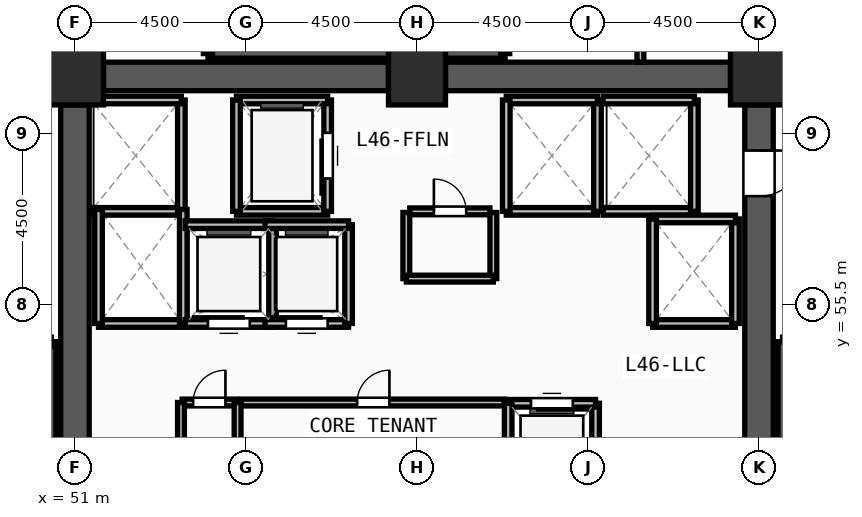
"""IFC4 building model, lengths in metres.
Left out: names, types, materials, properties, quantities, classifications, styles, units other than length and angle.
Written with IfcOpenShell. Run it as: python <this file> out.ifc"""

import sys

from ifc_helpers import new_model, si_unit, direction, frame, frame_2d, origin, origin_2d, place, context, subcontext, project, spatial, rectangle, extrude, source, transform, mapped, element, fill, save


model = new_model("IFC4")
c1 = context("Model", 3, precision=1e-05, world=origin(), true_north=direction((0.0, 1.0)))
c2 = subcontext(c1, "Body", "Model", "MODEL_VIEW")
j1 = project(units=[si_unit("LENGTHUNIT", "METRE"), si_unit("PLANEANGLEUNIT", "RADIAN")], contexts=[c1])
p1 = place(None, origin())
s1 = spatial("IfcSite", under=j1, at=p1, CompositionType="ELEMENT")
p2 = place(p1, origin())
s2 = spatial("IfcBuilding", under=s1, at=p2, CompositionType="ELEMENT")
p3 = place(p2, frame((0.0, 0.0, 177.75)))
s3 = spatial("IfcBuildingStorey", under=s2, at=p3, CompositionType="ELEMENT", Elevation=177.75)
m1 = source(origin(), c2, "Body", "SweptSolid", [
    extrude(rectangle(XDim=1.5, YDim=1.5, at=origin_2d()), origin(), (0.0, 0.0, 1.0), 3.75),
])
for number, where, z_axis, x_axis in (
    (1, (69.0, 61.5, 0.0), (0.0, 0.0, 1.0), (1.0, 0.0, 0.0)),
    (2, (60.0, 61.5, 0.0), (0.0, 0.0, 1.0), (1.0, 0.0, 0.0)),
    (3, (51.0, 61.5, 0.0), (0.0, 0.0, 1.0), (1.0, 0.0, 0.0)),
):
    element("IfcColumn", number, at=place(p3, frame(where, z_axis=z_axis, x_axis=x_axis)), inside=s3, PredefinedType="COLUMN", context=c2, shape_type="MappedRepresentation", body=[
        mapped(m1, transform((0.0, 0.0, 0.0), x_axis=(1.0, 0.0, 0.0), y_axis=(0.0, 1.0, 0.0), z_axis=(0.0, 0.0, 1.0), scale=1.0)),
    ])
for number, where, z_axis, x_axis in (
    (4, (51.75, 61.5, 0.0), (0.0, 0.0, 1.0), (1.0, 0.0, 0.0)),
    (5, (60.75, 61.5, 0.0), (0.0, 0.0, 1.0), (1.0, 0.0, 0.0)),
):
    element("IfcWall", number, at=place(p3, frame(where, z_axis=z_axis, x_axis=x_axis)), inside=s3, PredefinedType="SHEAR", context=c2, shape_type="SweptSolid", body=[
        extrude(rectangle(XDim=7.5, YDim=0.75, at=frame_2d((3.75, 0.0))), origin(), (0.0, 0.0, 1.0), 3.57),
    ])
p4 = place(p3, frame((69.0, 60.75, 0.0), z_axis=(0.0, 0.0, 1.0), x_axis=(0.0, -1.0, 0.0)))
e6 = element("IfcWall", 6, at=p4, inside=s3, PredefinedType="SHEAR", context=c2, shape_type="SweptSolid", body=[
    extrude(rectangle(XDim=13.5, YDim=0.75, at=frame_2d((6.75, 0.0))), origin(), (0.0, 0.0, 1.0), 3.57),
])
m2 = source(origin(), c2, "Body", "SweptSolid", [
    extrude(rectangle(XDim=1.2, YDim=2.2, at=frame_2d((0.6, 1.1))), frame((0.0, 0.385, 0.0), z_axis=(0.0, -1.0, 0.0), x_axis=(1.0, 0.0, 0.0)), (0.0, 0.0, 1.0), 0.77),
])
p5 = place(p4, frame((1.2, 0.0, 0.0)))
e7 = element("IfcOpeningElement", 7, at=p5, cuts=e6, PredefinedType="OPENING", context=c2, shape_type="MappedRepresentation", body=[
    mapped(m2, transform((0.0, 0.0, 0.0), x_axis=(1.0, 0.0, 0.0), y_axis=(0.0, 1.0, 0.0), z_axis=(0.0, 0.0, 1.0), scale=1.0)),
])
p6 = place(p3, frame((51.0, 47.25, 0.0), z_axis=(0.0, 0.0, 1.0), x_axis=(0.0, 1.0, 0.0)))
e8 = element("IfcWall", 8, at=p6, inside=s3, PredefinedType="SHEAR", context=c2, shape_type="SweptSolid", body=[
    extrude(rectangle(XDim=13.5, YDim=0.75, at=frame_2d((6.75, 0.0))), origin(), (0.0, 0.0, 1.0), 3.57),
])
for number, where, z_axis, x_axis in (
    (9, (50.38, 46.7, 0.0), (0.0, 0.0, 1.0), (0.0, 1.0, 0.0)),
    (10, (69.62, 54.52, 0.0), (0.0, 0.0, 1.0), (0.0, -1.0, 0.0)),
    (11, (54.5, 62.1, 0.0), (0.0, 0.0, 1.0), (1.0, 0.0, 0.0)),
):
    element("IfcWall", number, at=place(p3, frame(where, z_axis=z_axis, x_axis=x_axis)), inside=s3, PredefinedType="SOLIDWALL", context=c2, shape_type="SweptSolid", body=[
        extrude(rectangle(XDim=7.82, YDim=0.24, at=frame_2d((3.91, 0.0))), origin(), (0.0, 0.0, 1.0), 3.57),
    ])
for number, where, z_axis, x_axis in (
    (12, (62.32, 62.1, 0.0), (0.0, 0.0, 1.0), (0.0, 1.0, 0.0)),
    (13, (54.5, 65.54, 0.0), (0.0, 0.0, 1.0), (0.0, -1.0, 0.0)),
):
    element("IfcWall", number, at=place(p3, frame(where, z_axis=z_axis, x_axis=x_axis)), inside=s3, PredefinedType="SOLIDWALL", context=c2, shape_type="SweptSolid", body=[
        extrude(rectangle(XDim=3.44, YDim=0.24, at=frame_2d((1.72, 0.0))), origin(), (0.0, 0.0, 1.0), 3.57),
    ])
p7 = place(p3, frame((55.25, 57.95, 0.0), z_axis=(0.0, 0.0, 1.0), x_axis=(1.0, 0.0, 0.0)))
e14 = element("IfcWall", 14, at=p7, inside=s3, PredefinedType="SOLIDWALL", context=c2, shape_type="SweptSolid", body=[
    extrude(rectangle(XDim=2.4, YDim=0.2, at=frame_2d((1.2, 0.0))), origin(), (0.0, 0.0, 1.0), 3.57),
])
p8 = place(p3, frame((57.65, 57.95, 0.0), z_axis=(0.0, 0.0, 1.0), x_axis=(0.0, 1.0, 0.0)))
e15 = element("IfcWall", 15, at=p8, inside=s3, PredefinedType="SOLIDWALL", context=c2, shape_type="SweptSolid", body=[
    extrude(rectangle(XDim=2.93, YDim=0.2, at=frame_2d((1.465, 0.0))), origin(), (0.0, 0.0, 1.0), 3.57),
])
m3 = source(origin(), c2, "Body", "SweptSolid", [
    extrude(rectangle(XDim=1.2, YDim=2.3, at=frame_2d((0.6, 1.15))), frame((0.0, 0.11, 0.0), z_axis=(0.0, -1.0, 0.0), x_axis=(1.0, 0.0, 0.0)), (0.0, 0.0, 1.0), 0.22),
])
p9 = place(p8, frame((0.865, 0.0, 0.0)))
e16 = element("IfcOpeningElement", 16, at=p9, cuts=e15, PredefinedType="OPENING", context=c2, shape_type="MappedRepresentation", body=[
    mapped(m3, transform((0.0, 0.0, 0.0), x_axis=(1.0, 0.0, 0.0), y_axis=(0.0, 1.0, 0.0), z_axis=(0.0, 0.0, 1.0), scale=1.0)),
])
p10 = place(p3, frame((57.65, 60.88, 0.0), z_axis=(0.0, 0.0, 1.0), x_axis=(-1.0, 0.0, 0.0)))
e17 = element("IfcWall", 17, at=p10, inside=s3, PredefinedType="SOLIDWALL", context=c2, shape_type="SweptSolid", body=[
    extrude(rectangle(XDim=2.4, YDim=0.2, at=frame_2d((1.2, 0.0))), origin(), (0.0, 0.0, 1.0), 3.57),
])
p11 = place(p3, frame((55.25, 60.88, 0.0), z_axis=(0.0, 0.0, 1.0), x_axis=(0.0, -1.0, 0.0)))
e18 = element("IfcWall", 18, at=p11, inside=s3, PredefinedType="SOLIDWALL", context=c2, shape_type="SweptSolid", body=[
    extrude(rectangle(XDim=2.93, YDim=0.2, at=frame_2d((1.465, 0.0))), origin(), (0.0, 0.0, 1.0), 3.57),
])
p12 = place(p3, frame((62.35, 57.95, 0.0), z_axis=(0.0, 0.0, 1.0), x_axis=(1.0, 0.0, 0.0)))
e19 = element("IfcWall", 19, at=p12, inside=s3, PredefinedType="SOLIDWALL", context=c2, shape_type="SweptSolid", body=[
    extrude(rectangle(XDim=2.4, YDim=0.2, at=frame_2d((1.2, 0.0))), origin(), (0.0, 0.0, 1.0), 3.57),
])
p13 = place(p3, frame((64.75, 57.95, 0.0), z_axis=(0.0, 0.0, 1.0), x_axis=(0.0, 1.0, 0.0)))
e20 = element("IfcWall", 20, at=p13, inside=s3, PredefinedType="SOLIDWALL", context=c2, shape_type="SweptSolid", body=[
    extrude(rectangle(XDim=2.93, YDim=0.2, at=frame_2d((1.465, 0.0))), origin(), (0.0, 0.0, 1.0), 3.57),
])
p14 = place(p3, frame((64.75, 60.88, 0.0), z_axis=(0.0, 0.0, 1.0), x_axis=(-1.0, 0.0, 0.0)))
e21 = element("IfcWall", 21, at=p14, inside=s3, PredefinedType="SOLIDWALL", context=c2, shape_type="SweptSolid", body=[
    extrude(rectangle(XDim=2.4, YDim=0.2, at=frame_2d((1.2, 0.0))), origin(), (0.0, 0.0, 1.0), 3.57),
])
p15 = place(p3, frame((62.35, 60.88, 0.0), z_axis=(0.0, 0.0, 1.0), x_axis=(0.0, -1.0, 0.0)))
e22 = element("IfcWall", 22, at=p15, inside=s3, PredefinedType="SOLIDWALL", context=c2, shape_type="SweptSolid", body=[
    extrude(rectangle(XDim=2.93, YDim=0.2, at=frame_2d((1.465, 0.0))), origin(), (0.0, 0.0, 1.0), 3.57),
])
p16 = place(p3, frame((64.9, 57.95, 0.0), z_axis=(0.0, 0.0, 1.0), x_axis=(1.0, 0.0, 0.0)))
e23 = element("IfcWall", 23, at=p16, inside=s3, PredefinedType="SOLIDWALL", context=c2, shape_type="SweptSolid", body=[
    extrude(rectangle(XDim=2.4, YDim=0.2, at=frame_2d((1.2, 0.0))), origin(), (0.0, 0.0, 1.0), 3.57),
])
p17 = place(p3, frame((67.3, 57.95, 0.0), z_axis=(0.0, 0.0, 1.0), x_axis=(0.0, 1.0, 0.0)))
e24 = element("IfcWall", 24, at=p17, inside=s3, PredefinedType="SOLIDWALL", context=c2, shape_type="SweptSolid", body=[
    extrude(rectangle(XDim=2.93, YDim=0.2, at=frame_2d((1.465, 0.0))), origin(), (0.0, 0.0, 1.0), 3.57),
])
for number, where, z_axis, x_axis in (
    (25, (67.3, 60.88, 0.0), (0.0, 0.0, 1.0), (-1.0, 0.0, 0.0)),
    (26, (51.4, 57.95, 0.0), (0.0, 0.0, 1.0), (1.0, 0.0, 0.0)),
):
    element("IfcWall", number, at=place(p3, frame(where, z_axis=z_axis, x_axis=x_axis)), inside=s3, PredefinedType="SOLIDWALL", context=c2, shape_type="SweptSolid", body=[
        extrude(rectangle(XDim=2.4, YDim=0.2, at=frame_2d((1.2, 0.0))), origin(), (0.0, 0.0, 1.0), 3.57),
    ])
p18 = place(p3, frame((53.8, 57.95, 0.0), z_axis=(0.0, 0.0, 1.0), x_axis=(0.0, 1.0, 0.0)))
e27 = element("IfcWall", 27, at=p18, inside=s3, PredefinedType="SOLIDWALL", context=c2, shape_type="SweptSolid", body=[
    extrude(rectangle(XDim=2.93, YDim=0.2, at=frame_2d((1.465, 0.0))), origin(), (0.0, 0.0, 1.0), 3.57),
])
p19 = place(p3, frame((53.8, 60.88, 0.0), z_axis=(0.0, 0.0, 1.0), x_axis=(-1.0, 0.0, 0.0)))
e28 = element("IfcWall", 28, at=p19, inside=s3, PredefinedType="SOLIDWALL", context=c2, shape_type="SweptSolid", body=[
    extrude(rectangle(XDim=2.4, YDim=0.2, at=frame_2d((1.2, 0.0))), origin(), (0.0, 0.0, 1.0), 3.57),
])
p20 = place(p3, frame((51.62, 55.0, 0.0), z_axis=(0.0, 0.0, 1.0), x_axis=(1.0, 0.0, 0.0)))
e29 = element("IfcWall", 29, at=p20, inside=s3, PredefinedType="SOLIDWALL", context=c2, shape_type="SweptSolid", body=[
    extrude(rectangle(XDim=2.23, YDim=0.2, at=frame_2d((1.115, 0.0))), origin(), (0.0, 0.0, 1.0), 3.57),
])
for number, where, z_axis, x_axis in (
    (30, (53.85, 55.0, 0.0), (0.0, 0.0, 1.0), (0.0, 1.0, 0.0)),
    (31, (51.62, 58.0, 0.0), (0.0, 0.0, 1.0), (0.0, -1.0, 0.0)),
):
    element("IfcWall", number, at=place(p3, frame(where, z_axis=z_axis, x_axis=x_axis)), inside=s3, PredefinedType="SOLIDWALL", context=c2, shape_type="SweptSolid", body=[
        extrude(rectangle(XDim=3.0, YDim=0.2, at=frame_2d((1.5, 0.0))), origin(), (0.0, 0.0, 1.0), 3.57),
    ])
p21 = place(p3, frame((66.2, 55.0, 0.0), z_axis=(0.0, 0.0, 1.0), x_axis=(1.0, 0.0, 0.0)))
e32 = element("IfcWall", 32, at=p21, inside=s3, PredefinedType="SOLIDWALL", context=c2, shape_type="SweptSolid", body=[
    extrude(rectangle(XDim=2.18, YDim=0.2, at=frame_2d((1.09, 0.0))), origin(), (0.0, 0.0, 1.0), 3.57),
])
p22 = place(p3, frame((68.38, 55.0, 0.0), z_axis=(0.0, 0.0, 1.0), x_axis=(0.0, 1.0, 0.0)))
e33 = element("IfcWall", 33, at=p22, inside=s3, PredefinedType="SOLIDWALL", context=c2, shape_type="SweptSolid", body=[
    extrude(rectangle(XDim=2.75, YDim=0.2, at=frame_2d((1.375, 0.0))), origin(), (0.0, 0.0, 1.0), 3.57),
])
p23 = place(p3, frame((68.38, 57.75, 0.0), z_axis=(0.0, 0.0, 1.0), x_axis=(-1.0, 0.0, 0.0)))
e34 = element("IfcWall", 34, at=p23, inside=s3, PredefinedType="SOLIDWALL", context=c2, shape_type="SweptSolid", body=[
    extrude(rectangle(XDim=2.18, YDim=0.2, at=frame_2d((1.09, 0.0))), origin(), (0.0, 0.0, 1.0), 3.57),
])
p24 = place(p3, frame((66.2, 57.75, 0.0), z_axis=(0.0, 0.0, 1.0), x_axis=(0.0, -1.0, 0.0)))
e35 = element("IfcWall", 35, at=p24, inside=s3, PredefinedType="SOLIDWALL", context=c2, shape_type="SweptSolid", body=[
    extrude(rectangle(XDim=2.75, YDim=0.2, at=frame_2d((1.375, 0.0))), origin(), (0.0, 0.0, 1.0), 3.57),
])
p25 = place(p3, frame((64.7, 50.3, 0.0), z_axis=(0.0, 0.0, 1.0), x_axis=(0.0, 1.0, 0.0)))
e36 = element("IfcWall", 36, at=p25, inside=s3, PredefinedType="SOLIDWALL", context=c2, shape_type="SweptSolid", body=[
    extrude(rectangle(XDim=2.6, YDim=0.2, at=frame_2d((1.3, 0.0))), origin(), (0.0, 0.0, 1.0), 3.57),
])
p26 = place(p3, frame((64.7, 52.9, 0.0), z_axis=(0.0, 0.0, 1.0), x_axis=(-1.0, 0.0, 0.0)))
e37 = element("IfcWall", 37, at=p26, inside=s3, PredefinedType="SOLIDWALL", context=c2, shape_type="SweptSolid", body=[
    extrude(rectangle(XDim=2.3, YDim=0.2, at=frame_2d((1.15, 0.0))), origin(), (0.0, 0.0, 1.0), 3.57),
])
m4 = source(origin(), c2, "Body", "SweptSolid", [
    extrude(rectangle(XDim=1.1, YDim=2.2, at=frame_2d((0.55, 1.1))), frame((0.0, 0.11, 0.0), z_axis=(0.0, -1.0, 0.0), x_axis=(1.0, 0.0, 0.0)), (0.0, 0.0, 1.0), 0.22),
])
p27 = place(p26, frame((0.6, 0.0, 0.0)))
e38 = element("IfcOpeningElement", 38, at=p27, cuts=e37, PredefinedType="OPENING", context=c2, shape_type="MappedRepresentation", body=[
    mapped(m4, transform((0.0, 0.0, 0.0), x_axis=(1.0, 0.0, 0.0), y_axis=(0.0, 1.0, 0.0), z_axis=(0.0, 0.0, 1.0), scale=1.0)),
])
p28 = place(p3, frame((62.4, 52.9, 0.0), z_axis=(0.0, 0.0, 1.0), x_axis=(0.0, -1.0, 0.0)))
e39 = element("IfcWall", 39, at=p28, inside=s3, PredefinedType="SOLIDWALL", context=c2, shape_type="SweptSolid", body=[
    extrude(rectangle(XDim=2.6, YDim=0.2, at=frame_2d((1.3, 0.0))), origin(), (0.0, 0.0, 1.0), 3.57),
])
p29 = place(p3, frame((53.9, 55.0, 0.0), z_axis=(0.0, 0.0, 1.0), x_axis=(1.0, 0.0, 0.0)))
e40 = element("IfcWall", 40, at=p29, inside=s3, PredefinedType="SOLIDWALL", context=c2, shape_type="SweptSolid", body=[
    extrude(rectangle(XDim=2.3, YDim=0.2, at=frame_2d((1.15, 0.0))), origin(), (0.0, 0.0, 1.0), 3.57),
])
p30 = place(p29, frame((0.6, 0.0, 0.0)))
e41 = element("IfcOpeningElement", 41, at=p30, cuts=e40, PredefinedType="OPENING", context=c2, shape_type="MappedRepresentation", body=[
    mapped(m4, transform((0.0, 0.0, 0.0), x_axis=(1.0, 0.0, 0.0), y_axis=(0.0, 1.0, 0.0), z_axis=(0.0, 0.0, 1.0), scale=1.0)),
])
p31 = place(p3, frame((56.2, 55.0, 0.0), z_axis=(0.0, 0.0, 1.0), x_axis=(0.0, 1.0, 0.0)))
e42 = element("IfcWall", 42, at=p31, inside=s3, PredefinedType="SOLIDWALL", context=c2, shape_type="SweptSolid", body=[
    extrude(rectangle(XDim=2.6, YDim=0.2, at=frame_2d((1.3, 0.0))), origin(), (0.0, 0.0, 1.0), 3.57),
])
p32 = place(p3, frame((56.2, 57.6, 0.0), z_axis=(0.0, 0.0, 1.0), x_axis=(-1.0, 0.0, 0.0)))
e43 = element("IfcWall", 43, at=p32, inside=s3, PredefinedType="SOLIDWALL", context=c2, shape_type="SweptSolid", body=[
    extrude(rectangle(XDim=2.3, YDim=0.2, at=frame_2d((1.15, 0.0))), origin(), (0.0, 0.0, 1.0), 3.57),
])
p33 = place(p3, frame((56.0, 55.0, 0.0), z_axis=(0.0, 0.0, 1.0), x_axis=(1.0, 0.0, 0.0)))
e44 = element("IfcWall", 44, at=p33, inside=s3, PredefinedType="SOLIDWALL", context=c2, shape_type="SweptSolid", body=[
    extrude(rectangle(XDim=2.2, YDim=0.2, at=frame_2d((1.1, 0.0))), origin(), (0.0, 0.0, 1.0), 3.57),
])
p34 = place(p33, frame((0.55, 0.0, 0.0)))
e45 = element("IfcOpeningElement", 45, at=p34, cuts=e44, PredefinedType="OPENING", context=c2, shape_type="MappedRepresentation", body=[
    mapped(m4, transform((0.0, 0.0, 0.0), x_axis=(1.0, 0.0, 0.0), y_axis=(0.0, 1.0, 0.0), z_axis=(0.0, 0.0, 1.0), scale=1.0)),
])
p35 = place(p3, frame((58.2, 55.0, 0.0), z_axis=(0.0, 0.0, 1.0), x_axis=(0.0, 1.0, 0.0)))
e46 = element("IfcWall", 46, at=p35, inside=s3, PredefinedType="SOLIDWALL", context=c2, shape_type="SweptSolid", body=[
    extrude(rectangle(XDim=2.6, YDim=0.2, at=frame_2d((1.3, 0.0))), origin(), (0.0, 0.0, 1.0), 3.57),
])
p36 = place(p3, frame((58.2, 57.6, 0.0), z_axis=(0.0, 0.0, 1.0), x_axis=(-1.0, 0.0, 0.0)))
e47 = element("IfcWall", 47, at=p36, inside=s3, PredefinedType="SOLIDWALL", context=c2, shape_type="SweptSolid", body=[
    extrude(rectangle(XDim=2.2, YDim=0.2, at=frame_2d((1.1, 0.0))), origin(), (0.0, 0.0, 1.0), 3.57),
])
p37 = place(p3, frame((55.37, 52.92, 0.0), z_axis=(0.0, 0.0, 1.0), x_axis=(1.0, 0.0, 0.0)))
e48 = element("IfcWall", 48, at=p37, inside=s3, PredefinedType="PARTITIONING", context=c2, shape_type="SweptSolid", body=[
    extrude(rectangle(XDim=6.93, YDim=0.18, at=frame_2d((3.465, 0.0))), origin(), (0.0, 0.0, 1.0), 3.57),
])
m5 = source(origin(), c2, "Body", "SweptSolid", [
    extrude(rectangle(XDim=0.85, YDim=2.1, at=frame_2d((0.425, 1.05))), frame((0.0, 0.1, 0.0), z_axis=(0.0, -1.0, 0.0), x_axis=(1.0, 0.0, 0.0)), (0.0, 0.0, 1.0), 0.2),
])
p38 = place(p37, frame((3.055, 0.0, 0.0)))
e49 = element("IfcOpeningElement", 49, at=p38, cuts=e48, PredefinedType="OPENING", context=c2, shape_type="MappedRepresentation", body=[
    mapped(m5, transform((0.0, 0.0, 0.0), x_axis=(1.0, 0.0, 0.0), y_axis=(0.0, 1.0, 0.0), z_axis=(0.0, 0.0, 1.0), scale=1.0)),
])
p39 = place(p3, frame((59.81, 57.95, 0.0), z_axis=(0.0, 0.0, 1.0), x_axis=(1.0, 0.0, 0.0)))
e50 = element("IfcWall", 50, at=p39, inside=s3, PredefinedType="PARTITIONING", context=c2, shape_type="SweptSolid", body=[
    extrude(rectangle(XDim=2.11, YDim=0.18, at=frame_2d((1.055, 0.0))), origin(), (0.0, 0.0, 1.0), 3.57),
])
p40 = place(p39, frame((0.635, 0.0, 0.0)))
e51 = element("IfcOpeningElement", 51, at=p40, cuts=e50, PredefinedType="OPENING", context=c2, shape_type="MappedRepresentation", body=[
    mapped(m5, transform((0.0, 0.0, 0.0), x_axis=(1.0, 0.0, 0.0), y_axis=(0.0, 1.0, 0.0), z_axis=(0.0, 0.0, 1.0), scale=1.0)),
])
p41 = place(p3, frame((53.82, 52.92, 0.0), z_axis=(0.0, 0.0, 1.0), x_axis=(1.0, 0.0, 0.0)))
e52 = element("IfcWall", 52, at=p41, inside=s3, PredefinedType="PARTITIONING", context=c2, shape_type="SweptSolid", body=[
    extrude(rectangle(XDim=1.43, YDim=0.18, at=frame_2d((0.715, 0.0))), origin(), (0.0, 0.0, 1.0), 3.57),
])
p42 = place(p41, frame((0.29, 0.0, 0.0)))
e53 = element("IfcOpeningElement", 53, at=p42, cuts=e52, PredefinedType="OPENING", context=c2, shape_type="MappedRepresentation", body=[
    mapped(m5, transform((0.0, 0.0, 0.0), x_axis=(1.0, 0.0, 0.0), y_axis=(0.0, 1.0, 0.0), z_axis=(0.0, 0.0, 1.0), scale=1.0)),
])
for number, where, z_axis, x_axis in (
    (54, (59.72, 56.18, 0.0), (0.0, 0.0, 1.0), (0.0, 1.0, 0.0)),
    (55, (62.01, 56.18, 0.0), (0.0, 0.0, 1.0), (0.0, 1.0, 0.0)),
):
    element("IfcWall", number, at=place(p3, frame(where, z_axis=z_axis, x_axis=x_axis)), inside=s3, PredefinedType="PARTITIONING", context=c2, shape_type="SweptSolid", body=[
        extrude(rectangle(XDim=1.74, YDim=0.18, at=frame_2d((0.87, 0.0))), origin(), (0.0, 0.0, 1.0), 3.57),
    ])
p43 = place(p3, frame((59.72, 56.18, 0.0), z_axis=(0.0, 0.0, 1.0), x_axis=(1.0, 0.0, 0.0)))
e56 = element("IfcWall", 56, at=p43, inside=s3, PredefinedType="PARTITIONING", context=c2, shape_type="SweptSolid", body=[
    extrude(rectangle(XDim=2.29, YDim=0.18, at=frame_2d((1.145, 0.0))), origin(), (0.0, 0.0, 1.0), 3.57),
])
for number, where, z_axis, x_axis in (
    (57, (53.79, 50.35, 0.0), (0.0, 0.0, 1.0), (0.0, 1.0, 0.0)),
    (58, (55.28, 50.35, 0.0), (0.0, 0.0, 1.0), (0.0, 1.0, 0.0)),
):
    element("IfcWall", number, at=place(p3, frame(where, z_axis=z_axis, x_axis=x_axis)), inside=s3, PredefinedType="PARTITIONING", context=c2, shape_type="SweptSolid", body=[
        extrude(rectangle(XDim=2.57, YDim=0.18, at=frame_2d((1.285, 0.0))), origin(), (0.0, 0.0, 1.0), 3.57),
    ])
p44 = place(p3, frame((65.88, 61.875, 0.0), z_axis=(0.0, 0.0, 1.0), x_axis=(0.0, 1.0, 0.0)))
e59 = element("IfcWall", 59, at=p44, inside=s3, PredefinedType="PARTITIONING", context=c2, shape_type="SweptSolid", body=[
    extrude(rectangle(XDim=3.705, YDim=0.18, at=frame_2d((1.853, 0.0))), origin(), (0.0, 0.0, 1.0), 3.57),
])
p45 = place(p3, frame((69.46, 61.95, 0.0), z_axis=(0.0, 0.0, 1.0), x_axis=(0.0, 1.0, 0.0)))
e60 = element("IfcWall", 60, at=p45, inside=s3, PredefinedType="PARTITIONING", context=c2, shape_type="SweptSolid", body=[
    extrude(rectangle(XDim=3.63, YDim=0.18, at=frame_2d((1.815, 0.0))), origin(), (0.0, 0.0, 1.0), 3.57),
])
m6 = source(origin(), c2, "Body", "SweptSolid", [
    extrude(rectangle(XDim=1.2, YDim=2.2, at=frame_2d((0.6, 1.1))), frame((0.0, 0.025, 0.0), z_axis=(0.0, -1.0, 0.0), x_axis=(1.0, 0.0, 0.0)), (0.0, 0.0, 1.0), 0.05),
])
p46 = place(p5, origin())
e61 = element("IfcDoor", 61, at=p46, inside=s3, OperationType="SINGLE_SWING_LEFT", PredefinedType="DOOR", context=c2, shape_type="MappedRepresentation", body=[
    mapped(m6, transform((0.0, 0.0, 0.0), x_axis=(1.0, 0.0, 0.0), y_axis=(0.0, 1.0, 0.0), z_axis=(0.0, 0.0, 1.0), scale=1.0)),
])
fill(e7, e61)
m7 = source(origin(), c2, "Body", "SweptSolid", [
    extrude(rectangle(XDim=1.2, YDim=2.3, at=frame_2d((0.6, 1.15))), frame((0.0, 0.025, 0.0), z_axis=(0.0, -1.0, 0.0), x_axis=(1.0, 0.0, 0.0)), (0.0, 0.0, 1.0), 0.05),
])
p47 = place(p9, origin())
e62 = element("IfcDoor", 62, at=p47, inside=s3, OperationType="SLIDING_TO_LEFT", PredefinedType="DOOR", context=c2, shape_type="MappedRepresentation", body=[
    mapped(m7, transform((0.0, 0.0, 0.0), x_axis=(1.0, 0.0, 0.0), y_axis=(0.0, 1.0, 0.0), z_axis=(0.0, 0.0, 1.0), scale=1.0)),
])
fill(e16, e62)
m8 = source(origin(), c2, "Body", "SweptSolid", [
    extrude(rectangle(XDim=1.1, YDim=2.2, at=frame_2d((0.55, 1.1))), frame((0.0, 0.025, 0.0), z_axis=(0.0, -1.0, 0.0), x_axis=(1.0, 0.0, 0.0)), (0.0, 0.0, 1.0), 0.05),
])
p48 = place(p27, origin())
e63 = element("IfcDoor", 63, at=p48, inside=s3, OperationType="SLIDING_TO_LEFT", PredefinedType="DOOR", context=c2, shape_type="MappedRepresentation", body=[
    mapped(m8, transform((0.0, 0.0, 0.0), x_axis=(1.0, 0.0, 0.0), y_axis=(0.0, 1.0, 0.0), z_axis=(0.0, 0.0, 1.0), scale=1.0)),
])
fill(e38, e63)
p49 = place(p30, origin())
e64 = element("IfcDoor", 64, at=p49, inside=s3, OperationType="SLIDING_TO_LEFT", PredefinedType="DOOR", context=c2, shape_type="MappedRepresentation", body=[
    mapped(m8, transform((0.0, 0.0, 0.0), x_axis=(1.0, 0.0, 0.0), y_axis=(0.0, 1.0, 0.0), z_axis=(0.0, 0.0, 1.0), scale=1.0)),
])
fill(e41, e64)
p50 = place(p34, origin())
e65 = element("IfcDoor", 65, at=p50, inside=s3, OperationType="SLIDING_TO_LEFT", PredefinedType="DOOR", context=c2, shape_type="MappedRepresentation", body=[
    mapped(m8, transform((0.0, 0.0, 0.0), x_axis=(1.0, 0.0, 0.0), y_axis=(0.0, 1.0, 0.0), z_axis=(0.0, 0.0, 1.0), scale=1.0)),
])
fill(e45, e65)
m9 = source(origin(), c2, "Body", "SweptSolid", [
    extrude(rectangle(XDim=0.85, YDim=2.1, at=frame_2d((0.425, 1.05))), frame((0.0, 0.025, 0.0), z_axis=(0.0, -1.0, 0.0), x_axis=(1.0, 0.0, 0.0)), (0.0, 0.0, 1.0), 0.05),
])
p51 = place(p38, origin())
e66 = element("IfcDoor", 66, at=p51, inside=s3, OperationType="SINGLE_SWING_RIGHT", PredefinedType="DOOR", context=c2, shape_type="MappedRepresentation", body=[
    mapped(m9, transform((0.0, 0.0, 0.0), x_axis=(1.0, 0.0, 0.0), y_axis=(0.0, 1.0, 0.0), z_axis=(0.0, 0.0, 1.0), scale=1.0)),
])
fill(e49, e66)
p52 = place(p40, origin())
e67 = element("IfcDoor", 67, at=p52, inside=s3, OperationType="SINGLE_SWING_LEFT", PredefinedType="DOOR", context=c2, shape_type="MappedRepresentation", body=[
    mapped(m9, transform((0.0, 0.0, 0.0), x_axis=(1.0, 0.0, 0.0), y_axis=(0.0, 1.0, 0.0), z_axis=(0.0, 0.0, 1.0), scale=1.0)),
])
fill(e51, e67)
p53 = place(p42, origin())
e68 = element("IfcDoor", 68, at=p53, inside=s3, OperationType="SINGLE_SWING_RIGHT", PredefinedType="DOOR", context=c2, shape_type="MappedRepresentation", body=[
    mapped(m9, transform((0.0, 0.0, 0.0), x_axis=(1.0, 0.0, 0.0), y_axis=(0.0, 1.0, 0.0), z_axis=(0.0, 0.0, 1.0), scale=1.0)),
])
fill(e53, e68)
save(model, sys.argv[1])
